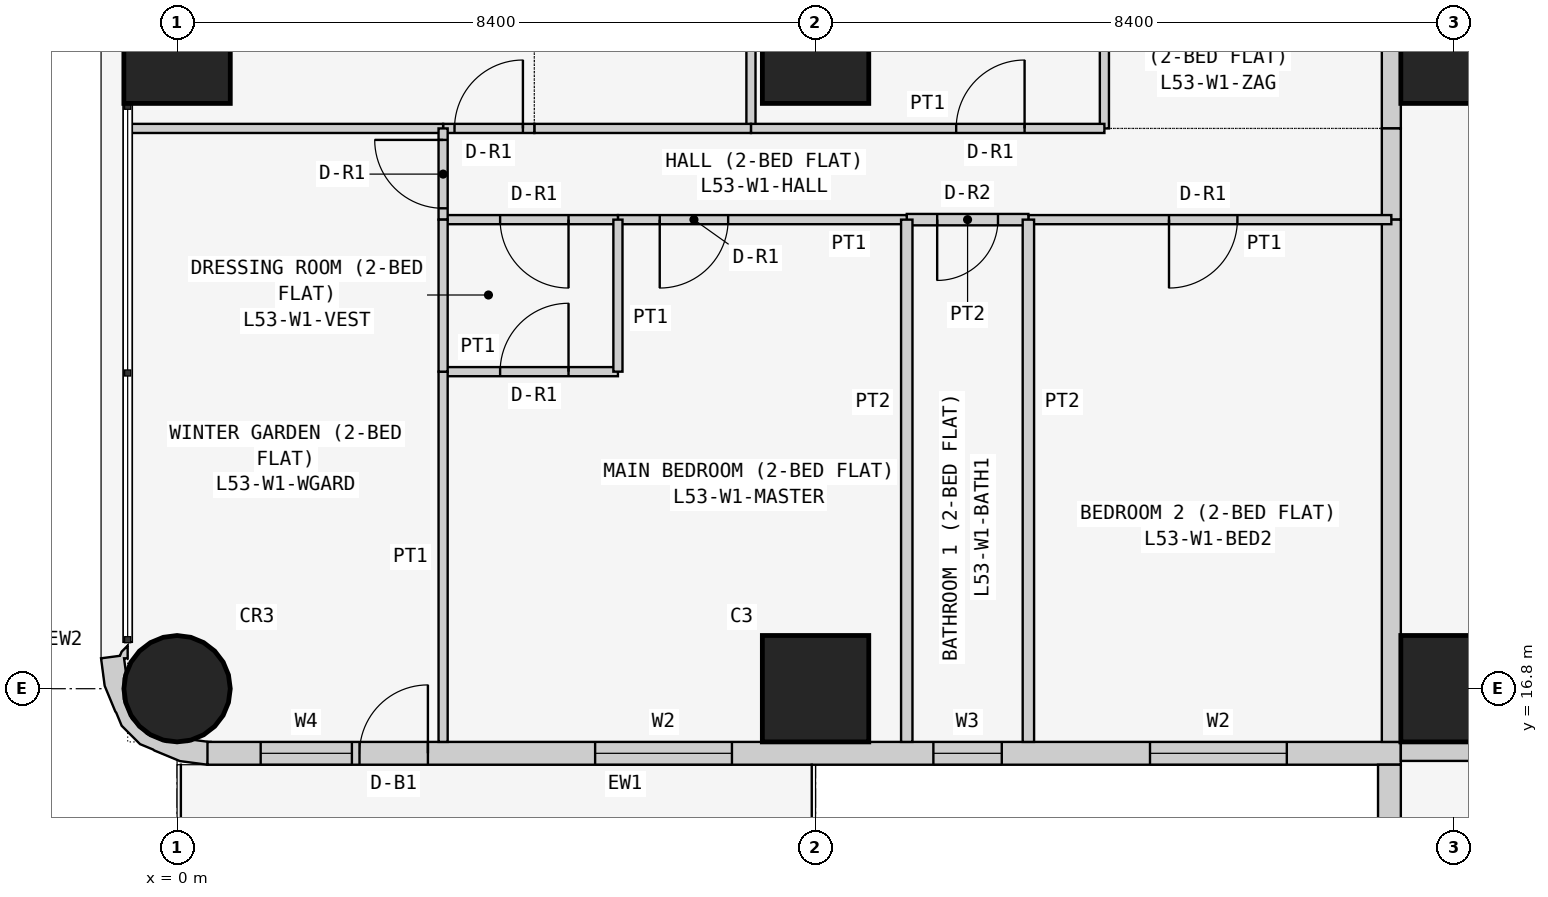
"""IFC4 building model, lengths in metres.
Left out: names, types, materials, properties, quantities, classifications, styles, units other than length and angle.
Written with IfcOpenShell. Run it as: python <this file> out.ifc"""

import sys

from ifc_helpers import new_model, si_unit, direction, frame, frame_2d, origin, origin_2d, place, context, subcontext, project, spatial, polyline, rectangle, circle, outline, extrude, element, fill, save


model = new_model("IFC4")
c1 = context("Model", 3, precision=1e-05, world=origin(), true_north=direction((0.0, 1.0)))
c2 = subcontext(c1, "Body", "Model", "MODEL_VIEW")
j1 = project(units=[si_unit("LENGTHUNIT", "METRE"), si_unit("PLANEANGLEUNIT", "RADIAN")], contexts=[c1])
p1 = place(None, origin())
s1 = spatial("IfcSite", under=j1, at=p1, CompositionType="ELEMENT")
p2 = place(p1, origin())
s2 = spatial("IfcBuilding", under=s1, at=p2, CompositionType="ELEMENT")
p3 = place(p2, frame((0.0, 0.0, 204.9)))
s3 = spatial("IfcBuildingStorey", under=s2, at=p3, CompositionType="ELEMENT", Elevation=204.9)
p4 = place(p3, frame((0.0, 16.8, 0.0), z_axis=(0.0, 0.0, 1.0), x_axis=(1.0, 0.0, 0.0)))
e1 = element("IfcColumn", 1, at=p4, inside=s3, PredefinedType="COLUMN", context=c2, shape_type="SweptSolid", body=[
    extrude(circle(Radius=0.7, at=origin_2d()), origin(), (0.0, 0.0, 1.0), 3.6),
])
for number, where, z_axis, x_axis in (
    (2, (0.0, 25.2, 0.0), (0.0, 0.0, 1.0), (1.0, 0.0, 0.0)),
    (3, (8.4, 16.8, 0.0), (0.0, 0.0, 1.0), (1.0, 0.0, 0.0)),
    (4, (8.4, 25.2, 0.0), (0.0, 0.0, 1.0), (1.0, 0.0, 0.0)),
    (5, (16.8, 16.8, 0.0), (0.0, 0.0, 1.0), (1.0, 0.0, 0.0)),
    (6, (16.8, 25.2, 0.0), (0.0, 0.0, 1.0), (1.0, 0.0, 0.0)),
):
    element("IfcColumn", number, at=place(p3, frame(where, z_axis=z_axis, x_axis=x_axis)), inside=s3, PredefinedType="COLUMN", context=c2, shape_type="SweptSolid", body=[
        extrude(rectangle(XDim=1.4, YDim=1.4, at=origin_2d()), origin(), (0.0, 0.0, 1.0), 3.6),
    ])
p5 = place(p3, frame((0.4, 15.95, 0.0), z_axis=(0.0, 0.0, 1.0), x_axis=(1.0, 0.0, 0.0)))
e7 = element("IfcWall", 7, at=p5, inside=s3, PredefinedType="SOLIDWALL", context=c2, shape_type="SweptSolid", body=[
    extrude(rectangle(XDim=15.7, YDim=0.3, at=frame_2d((7.85, 0.0))), origin(), (0.0, 0.0, 1.0), 3.45),
])
p6 = place(p5, frame((12.4, 0.0, 0.9)))
e8 = element("IfcOpeningElement", 8, at=p6, cuts=e7, PredefinedType="OPENING", context=c2, shape_type="SweptSolid", body=[
    extrude(rectangle(XDim=1.8, YDim=1.5, at=frame_2d((0.9, 0.75))), frame((0.0, 0.16, 0.0), z_axis=(0.0, -1.0, 0.0), x_axis=(1.0, 0.0, 0.0)), (0.0, 0.0, 1.0), 0.32),
])
p7 = place(p5, frame((9.55, 0.0, 1.5)))
e9 = element("IfcOpeningElement", 9, at=p7, cuts=e7, PredefinedType="OPENING", context=c2, shape_type="SweptSolid", body=[
    extrude(rectangle(XDim=0.9, YDim=0.7, at=frame_2d((0.45, 0.35))), frame((0.0, 0.16, 0.0), z_axis=(0.0, -1.0, 0.0), x_axis=(1.0, 0.0, 0.0)), (0.0, 0.0, 1.0), 0.32),
])
p8 = place(p5, frame((5.1, 0.0, 0.9)))
e10 = element("IfcOpeningElement", 10, at=p8, cuts=e7, PredefinedType="OPENING", context=c2, shape_type="SweptSolid", body=[
    extrude(rectangle(XDim=1.8, YDim=1.5, at=frame_2d((0.9, 0.75))), frame((0.0, 0.16, 0.0), z_axis=(0.0, -1.0, 0.0), x_axis=(1.0, 0.0, 0.0)), (0.0, 0.0, 1.0), 0.32),
])
p9 = place(p5, frame((2.0, 0.0, 0.0)))
e11 = element("IfcOpeningElement", 11, at=p9, cuts=e7, PredefinedType="OPENING", context=c2, shape_type="SweptSolid", body=[
    extrude(rectangle(XDim=0.9, YDim=2.4, at=frame_2d((0.45, 1.2))), frame((0.0, 0.16, 0.0), z_axis=(0.0, -1.0, 0.0), x_axis=(1.0, 0.0, 0.0)), (0.0, 0.0, 1.0), 0.32),
])
p10 = place(p5, frame((0.7, 0.0, 0.9)))
e12 = element("IfcOpeningElement", 12, at=p10, cuts=e7, PredefinedType="OPENING", context=c2, shape_type="SweptSolid", body=[
    extrude(rectangle(XDim=1.2, YDim=1.5, at=frame_2d((0.6, 0.75))), frame((0.0, 0.16, 0.0), z_axis=(0.0, -1.0, 0.0), x_axis=(1.0, 0.0, 0.0)), (0.0, 0.0, 1.0), 0.32),
])
p11 = place(p3, frame((15.95, 15.8, 0.0), z_axis=(0.0, 0.0, 1.0), x_axis=(0.0, -1.0, 0.0)))
e13 = element("IfcWall", 13, at=p11, inside=s3, PredefinedType="SOLIDWALL", context=c2, shape_type="SweptSolid", body=[
    extrude(rectangle(XDim=7.0, YDim=0.3, at=frame_2d((3.5, 0.0))), origin(), (0.0, 0.0, 1.0), 3.45),
])
p12 = place(p11, frame((1.5, 0.0, 0.9)))
e14 = element("IfcOpeningElement", 14, at=p12, cuts=e13, PredefinedType="OPENING", context=c2, shape_type="SweptSolid", body=[
    extrude(rectangle(XDim=2.4, YDim=1.5, at=frame_2d((1.2, 0.75))), frame((0.0, 0.16, 0.0), z_axis=(0.0, -1.0, 0.0), x_axis=(1.0, 0.0, 0.0)), (0.0, 0.0, 1.0), 0.32),
])
p13 = place(p11, frame((5.05, 0.0, 0.9)))
e15 = element("IfcOpeningElement", 15, at=p13, cuts=e13, PredefinedType="OPENING", context=c2, shape_type="SweptSolid", body=[
    extrude(rectangle(XDim=1.2, YDim=1.5, at=frame_2d((0.6, 0.75))), frame((0.0, 0.16, 0.0), z_axis=(0.0, -1.0, 0.0), x_axis=(1.0, 0.0, 0.0)), (0.0, 0.0, 1.0), 0.32),
])
p14 = place(p3, frame((-0.588, 17.312, 0.0), z_axis=(0.0, 0.0, 1.0), x_axis=(-0.898030234854, -0.439933741929, 0.0)))
e16 = element("IfcWall", 16, at=p14, inside=s3, PredefinedType="SOLIDWALL", context=c2, shape_type="SweptSolid", body=[
    extrude(outline(polyline([(-0.222, 1.793), (-0.39, 1.541), (-0.372, 1.532), (-0.195, 1.415), (-0.12, 1.41), (0.131, 1.287), (0.315, 1.078), (0.406, 0.814), (0.388, 0.536), (0.265, 0.285), (0.209, 0.236), (0.148, 0.053), (0.105, 0.074), (0.032, -0.076), (0.138, -0.039), (0.182, -0.0), (0.419, -0.08), (0.536, 0.266), (0.559, 0.631), (0.555, 0.651), (0.566, 0.836), (0.456, 1.159), (0.333, 1.298), (0.324, 1.316), (0.082, 1.591), (-0.222, 1.793)])), origin(), (0.0, 0.0, 1.0), 3.45),
])
p15 = place(p3, frame((22.971, 15.975, 0.0), z_axis=(0.0, 0.0, 1.0), x_axis=(-1.0, 0.0, 0.0)))
e17 = element("IfcWall", 17, at=p15, inside=s3, PredefinedType="PARTITIONING", context=c2, shape_type="SweptSolid", body=[
    extrude(rectangle(XDim=6.871, YDim=0.25, at=frame_2d((3.436, 0.0))), origin(), (0.0, 0.0, 1.0), 3.45),
])
p16 = place(p3, frame((15.975, 24.171, 0.0), z_axis=(0.0, 0.0, 1.0), x_axis=(0.0, 1.0, 0.0)))
e18 = element("IfcWall", 18, at=p16, inside=s3, PredefinedType="PARTITIONING", context=c2, shape_type="SweptSolid", body=[
    extrude(rectangle(XDim=5.229, YDim=0.25, at=frame_2d((2.615, 0.0))), origin(), (0.0, 0.0, 1.0), 3.45),
])
p17 = place(p16, frame((2.129, 0.0, 0.0)))
e19 = element("IfcOpeningElement", 19, at=p17, cuts=e18, PredefinedType="OPENING", context=c2, shape_type="SweptSolid", body=[
    extrude(rectangle(XDim=1.0, YDim=2.1, at=frame_2d((0.5, 1.05))), frame((0.0, 0.135, 0.0), z_axis=(0.0, -1.0, 0.0), x_axis=(1.0, 0.0, 0.0)), (0.0, 0.0, 1.0), 0.27),
])
p18 = place(p3, frame((15.975, 22.971, 0.0), z_axis=(0.0, 0.0, 1.0), x_axis=(0.0, 1.0, 0.0)))
e20 = element("IfcWall", 20, at=p18, inside=s3, PredefinedType="PARTITIONING", context=c2, shape_type="SweptSolid", body=[
    extrude(rectangle(XDim=1.2, YDim=0.25, at=frame_2d((0.6, 0.0))), origin(), (0.0, 0.0, 1.0), 3.45),
])
p19 = place(p3, frame((15.975, 16.1, 0.0), z_axis=(0.0, 0.0, 1.0), x_axis=(0.0, 1.0, 0.0)))
e21 = element("IfcWall", 21, at=p19, inside=s3, PredefinedType="PARTITIONING", context=c2, shape_type="SweptSolid", body=[
    extrude(rectangle(XDim=6.871, YDim=0.25, at=frame_2d((3.436, 0.0))), origin(), (0.0, 0.0, 1.0), 3.45),
])
for number, where, z_axis, x_axis in (
    (22, (12.2, 29.4, 0.0), (0.0, 0.0, 1.0), (0.0, -1.0, 0.0)),
    (23, (7.55, 29.4, 0.0), (0.0, 0.0, 1.0), (0.0, -1.0, 0.0)),
):
    element("IfcWall", number, at=place(p3, frame(where, z_axis=z_axis, x_axis=x_axis)), inside=s3, PredefinedType="PARTITIONING", context=c2, shape_type="SweptSolid", body=[
        extrude(rectangle(XDim=5.229, YDim=0.12, at=frame_2d((2.615, 0.0))), origin(), (0.0, 0.0, 1.0), 3.45),
    ])
p20 = place(p3, frame((7.55, 24.171, 0.0), z_axis=(0.0, 0.0, 1.0), x_axis=(1.0, 0.0, 0.0)))
e24 = element("IfcWall", 24, at=p20, inside=s3, PredefinedType="PARTITIONING", context=c2, shape_type="SweptSolid", body=[
    extrude(rectangle(XDim=4.65, YDim=0.12, at=frame_2d((2.325, 0.0))), origin(), (0.0, 0.0, 1.0), 3.45),
])
p21 = place(p20, frame((2.7, 0.0, 0.0)))
e25 = element("IfcOpeningElement", 25, at=p21, cuts=e24, PredefinedType="OPENING", context=c2, shape_type="SweptSolid", body=[
    extrude(rectangle(XDim=0.9, YDim=2.1, at=frame_2d((0.45, 1.05))), frame((0.0, 0.07, 0.0), z_axis=(0.0, -1.0, 0.0), x_axis=(1.0, 0.0, 0.0)), (0.0, 0.0, 1.0), 0.14),
])
p22 = place(p3, frame((4.7, 24.171, 0.0), z_axis=(0.0, 0.0, 1.0), x_axis=(1.0, 0.0, 0.0)))
e26 = element("IfcWall", 26, at=p22, inside=s3, PredefinedType="PARTITIONING", context=c2, shape_type="SweptSolid", body=[
    extrude(rectangle(XDim=2.85, YDim=0.12, at=frame_2d((1.425, 0.0))), origin(), (0.0, 0.0, 1.0), 3.45),
])
p23 = place(p3, frame((3.5, 24.171, 0.0), z_axis=(0.0, 0.0, 1.0), x_axis=(1.0, 0.0, 0.0)))
e27 = element("IfcWall", 27, at=p23, inside=s3, PredefinedType="PARTITIONING", context=c2, shape_type="SweptSolid", body=[
    extrude(rectangle(XDim=1.2, YDim=0.12, at=frame_2d((0.6, 0.0))), origin(), (0.0, 0.0, 1.0), 3.45),
])
p24 = place(p23, frame((0.15, 0.0, 0.0)))
e28 = element("IfcOpeningElement", 28, at=p24, cuts=e27, PredefinedType="OPENING", context=c2, shape_type="SweptSolid", body=[
    extrude(rectangle(XDim=0.9, YDim=2.1, at=frame_2d((0.45, 1.05))), frame((0.0, 0.07, 0.0), z_axis=(0.0, -1.0, 0.0), x_axis=(1.0, 0.0, 0.0)), (0.0, 0.0, 1.0), 0.14),
])
p25 = place(p3, frame((-0.65, 24.171, 0.0), z_axis=(0.0, 0.0, 1.0), x_axis=(1.0, 0.0, 0.0)))
e29 = element("IfcWall", 29, at=p25, inside=s3, PredefinedType="PARTITIONING", context=c2, shape_type="SweptSolid", body=[
    extrude(rectangle(XDim=4.15, YDim=0.12, at=frame_2d((2.075, 0.0))), origin(), (0.0, 0.0, 1.0), 3.45),
])
p26 = place(p3, frame((11.2, 22.971, 0.0), z_axis=(0.0, 0.0, 1.0), x_axis=(1.0, 0.0, 0.0)))
e30 = element("IfcWall", 30, at=p26, inside=s3, PredefinedType="PARTITIONING", context=c2, shape_type="SweptSolid", body=[
    extrude(rectangle(XDim=4.775, YDim=0.12, at=frame_2d((2.388, 0.0))), origin(), (0.0, 0.0, 1.0), 3.45),
])
p27 = place(p26, frame((1.85, 0.0, 0.0)))
e31 = element("IfcOpeningElement", 31, at=p27, cuts=e30, PredefinedType="OPENING", context=c2, shape_type="SweptSolid", body=[
    extrude(rectangle(XDim=0.9, YDim=2.1, at=frame_2d((0.45, 1.05))), frame((0.0, 0.07, 0.0), z_axis=(0.0, -1.0, 0.0), x_axis=(1.0, 0.0, 0.0)), (0.0, 0.0, 1.0), 0.14),
])
p28 = place(p3, frame((9.6, 22.971, 0.0), z_axis=(0.0, 0.0, 1.0), x_axis=(1.0, 0.0, 0.0)))
e32 = element("IfcWall", 32, at=p28, inside=s3, PredefinedType="PARTITIONING", context=c2, shape_type="SweptSolid", body=[
    extrude(rectangle(XDim=1.6, YDim=0.15, at=frame_2d((0.8, 0.0))), origin(), (0.0, 0.0, 1.0), 3.45),
])
p29 = place(p28, frame((0.4, 0.0, 0.0)))
e33 = element("IfcOpeningElement", 33, at=p29, cuts=e32, PredefinedType="OPENING", context=c2, shape_type="SweptSolid", body=[
    extrude(rectangle(XDim=0.8, YDim=2.1, at=frame_2d((0.4, 1.05))), frame((0.0, 0.085, 0.0), z_axis=(0.0, -1.0, 0.0), x_axis=(1.0, 0.0, 0.0)), (0.0, 0.0, 1.0), 0.17),
])
p30 = place(p3, frame((5.8, 22.971, 0.0), z_axis=(0.0, 0.0, 1.0), x_axis=(1.0, 0.0, 0.0)))
e34 = element("IfcWall", 34, at=p30, inside=s3, PredefinedType="PARTITIONING", context=c2, shape_type="SweptSolid", body=[
    extrude(rectangle(XDim=3.8, YDim=0.12, at=frame_2d((1.9, 0.0))), origin(), (0.0, 0.0, 1.0), 3.45),
])
p31 = place(p30, frame((0.55, 0.0, 0.0)))
e35 = element("IfcOpeningElement", 35, at=p31, cuts=e34, PredefinedType="OPENING", context=c2, shape_type="SweptSolid", body=[
    extrude(rectangle(XDim=0.9, YDim=2.1, at=frame_2d((0.45, 1.05))), frame((0.0, 0.07, 0.0), z_axis=(0.0, -1.0, 0.0), x_axis=(1.0, 0.0, 0.0)), (0.0, 0.0, 1.0), 0.14),
])
p32 = place(p3, frame((3.5, 22.971, 0.0), z_axis=(0.0, 0.0, 1.0), x_axis=(1.0, 0.0, 0.0)))
e36 = element("IfcWall", 36, at=p32, inside=s3, PredefinedType="PARTITIONING", context=c2, shape_type="SweptSolid", body=[
    extrude(rectangle(XDim=2.3, YDim=0.12, at=frame_2d((1.15, 0.0))), origin(), (0.0, 0.0, 1.0), 3.45),
])
p33 = place(p32, frame((0.75, 0.0, 0.0)))
e37 = element("IfcOpeningElement", 37, at=p33, cuts=e36, PredefinedType="OPENING", context=c2, shape_type="SweptSolid", body=[
    extrude(rectangle(XDim=0.9, YDim=2.1, at=frame_2d((0.45, 1.05))), frame((0.0, 0.07, 0.0), z_axis=(0.0, -1.0, 0.0), x_axis=(1.0, 0.0, 0.0)), (0.0, 0.0, 1.0), 0.14),
])
p34 = place(p3, frame((3.5, 24.171, 0.0), z_axis=(0.0, 0.0, 1.0), x_axis=(0.0, -1.0, 0.0)))
e38 = element("IfcWall", 38, at=p34, inside=s3, PredefinedType="PARTITIONING", context=c2, shape_type="SweptSolid", body=[
    extrude(rectangle(XDim=1.2, YDim=0.12, at=frame_2d((0.6, 0.0))), origin(), (0.0, 0.0, 1.0), 3.45),
])
p35 = place(p34, frame((0.151, 0.0, 0.0)))
e39 = element("IfcOpeningElement", 39, at=p35, cuts=e38, PredefinedType="OPENING", context=c2, shape_type="SweptSolid", body=[
    extrude(rectangle(XDim=0.9, YDim=2.1, at=frame_2d((0.45, 1.05))), frame((0.0, 0.07, 0.0), z_axis=(0.0, -1.0, 0.0), x_axis=(1.0, 0.0, 0.0)), (0.0, 0.0, 1.0), 0.14),
])
for number, where, z_axis, x_axis in (
    (40, (11.2, 22.971, 0.0), (0.0, 0.0, 1.0), (0.0, -1.0, 0.0)),
    (41, (9.6, 22.971, 0.0), (0.0, 0.0, 1.0), (0.0, -1.0, 0.0)),
):
    element("IfcWall", number, at=place(p3, frame(where, z_axis=z_axis, x_axis=x_axis)), inside=s3, PredefinedType="PARTITIONING", context=c2, shape_type="SweptSolid", body=[
        extrude(rectangle(XDim=6.871, YDim=0.15, at=frame_2d((3.436, 0.0))), origin(), (0.0, 0.0, 1.0), 3.45),
    ])
p36 = place(p3, frame((3.5, 20.971, 0.0), z_axis=(0.0, 0.0, 1.0), x_axis=(1.0, 0.0, 0.0)))
e42 = element("IfcWall", 42, at=p36, inside=s3, PredefinedType="PARTITIONING", context=c2, shape_type="SweptSolid", body=[
    extrude(rectangle(XDim=2.3, YDim=0.12, at=frame_2d((1.15, 0.0))), origin(), (0.0, 0.0, 1.0), 3.45),
])
p37 = place(p36, frame((0.75, 0.0, 0.0)))
e43 = element("IfcOpeningElement", 43, at=p37, cuts=e42, PredefinedType="OPENING", context=c2, shape_type="SweptSolid", body=[
    extrude(rectangle(XDim=0.9, YDim=2.1, at=frame_2d((0.45, 1.05))), frame((0.0, 0.07, 0.0), z_axis=(0.0, -1.0, 0.0), x_axis=(1.0, 0.0, 0.0)), (0.0, 0.0, 1.0), 0.14),
])
p38 = place(p3, frame((5.8, 20.971, 0.0), z_axis=(0.0, 0.0, 1.0), x_axis=(0.0, 1.0, 0.0)))
e44 = element("IfcWall", 44, at=p38, inside=s3, PredefinedType="PARTITIONING", context=c2, shape_type="SweptSolid", body=[
    extrude(rectangle(XDim=2.0, YDim=0.12, at=frame_2d((1.0, 0.0))), origin(), (0.0, 0.0, 1.0), 3.45),
])
p39 = place(p3, frame((3.5, 16.1, 0.0), z_axis=(0.0, 0.0, 1.0), x_axis=(0.0, 1.0, 0.0)))
e45 = element("IfcWall", 45, at=p39, inside=s3, PredefinedType="PARTITIONING", context=c2, shape_type="SweptSolid", body=[
    extrude(rectangle(XDim=4.871, YDim=0.12, at=frame_2d((2.436, 0.0))), origin(), (0.0, 0.0, 1.0), 3.45),
])
p40 = place(p3, frame((3.5, 22.971, 0.0), z_axis=(0.0, 0.0, 1.0), x_axis=(0.0, -1.0, 0.0)))
e46 = element("IfcWall", 46, at=p40, inside=s3, PredefinedType="PARTITIONING", context=c2, shape_type="SweptSolid", body=[
    extrude(rectangle(XDim=2.0, YDim=0.12, at=frame_2d((1.0, 0.0))), origin(), (0.0, 0.0, 1.0), 3.45),
])
p41 = place(p6, origin())
e47 = element("IfcWindow", 47, at=p41, inside=s3, PartitioningType="SINGLE_PANEL", PredefinedType="WINDOW", context=c2, shape_type="SweptSolid", body=[
    extrude(rectangle(XDim=1.8, YDim=1.5, at=frame_2d((0.9, 0.75))), frame((0.0, 0.03, 0.0), z_axis=(0.0, -1.0, 0.0), x_axis=(1.0, 0.0, 0.0)), (0.0, 0.0, 1.0), 0.06),
])
fill(e8, e47)
p42 = place(p7, origin())
e48 = element("IfcWindow", 48, at=p42, inside=s3, PartitioningType="SINGLE_PANEL", PredefinedType="WINDOW", context=c2, shape_type="SweptSolid", body=[
    extrude(rectangle(XDim=0.9, YDim=0.7, at=frame_2d((0.45, 0.35))), frame((0.0, 0.03, 0.0), z_axis=(0.0, -1.0, 0.0), x_axis=(1.0, 0.0, 0.0)), (0.0, 0.0, 1.0), 0.06),
])
fill(e9, e48)
p43 = place(p8, origin())
e49 = element("IfcWindow", 49, at=p43, inside=s3, PartitioningType="SINGLE_PANEL", PredefinedType="WINDOW", context=c2, shape_type="SweptSolid", body=[
    extrude(rectangle(XDim=1.8, YDim=1.5, at=frame_2d((0.9, 0.75))), frame((0.0, 0.03, 0.0), z_axis=(0.0, -1.0, 0.0), x_axis=(1.0, 0.0, 0.0)), (0.0, 0.0, 1.0), 0.06),
])
fill(e10, e49)
p44 = place(p9, origin())
e50 = element("IfcDoor", 50, at=p44, inside=s3, OperationType="SINGLE_SWING_RIGHT", PredefinedType="DOOR", context=c2, shape_type="SweptSolid", body=[
    extrude(rectangle(XDim=0.9, YDim=2.4, at=frame_2d((0.45, 1.2))), frame((0.0, 0.025, 0.0), z_axis=(0.0, -1.0, 0.0), x_axis=(1.0, 0.0, 0.0)), (0.0, 0.0, 1.0), 0.05),
])
fill(e11, e50)
p45 = place(p10, origin())
e51 = element("IfcWindow", 51, at=p45, inside=s3, PartitioningType="SINGLE_PANEL", PredefinedType="WINDOW", context=c2, shape_type="SweptSolid", body=[
    extrude(rectangle(XDim=1.2, YDim=1.5, at=frame_2d((0.6, 0.75))), frame((0.0, 0.03, 0.0), z_axis=(0.0, -1.0, 0.0), x_axis=(1.0, 0.0, 0.0)), (0.0, 0.0, 1.0), 0.06),
])
fill(e12, e51)
p46 = place(p21, origin())
e52 = element("IfcDoor", 52, at=p46, inside=s3, OperationType="SINGLE_SWING_RIGHT", PredefinedType="DOOR", context=c2, shape_type="SweptSolid", body=[
    extrude(rectangle(XDim=0.9, YDim=2.1, at=frame_2d((0.45, 1.05))), frame((0.0, 0.025, 0.0), z_axis=(0.0, -1.0, 0.0), x_axis=(1.0, 0.0, 0.0)), (0.0, 0.0, 1.0), 0.05),
])
fill(e25, e52)
p47 = place(p24, origin())
e53 = element("IfcDoor", 53, at=p47, inside=s3, OperationType="SINGLE_SWING_RIGHT", PredefinedType="DOOR", context=c2, shape_type="SweptSolid", body=[
    extrude(rectangle(XDim=0.9, YDim=2.1, at=frame_2d((0.45, 1.05))), frame((0.0, 0.025, 0.0), z_axis=(0.0, -1.0, 0.0), x_axis=(1.0, 0.0, 0.0)), (0.0, 0.0, 1.0), 0.05),
])
fill(e28, e53)
p48 = place(p27, frame((0.9, 0.0, 0.0), z_axis=(0.0, 0.0, 1.0), x_axis=(-1.0, 0.0, 0.0)))
e54 = element("IfcDoor", 54, at=p48, inside=s3, OperationType="SINGLE_SWING_RIGHT", PredefinedType="DOOR", context=c2, shape_type="SweptSolid", body=[
    extrude(rectangle(XDim=0.9, YDim=2.1, at=frame_2d((0.45, 1.05))), frame((0.0, 0.025, 0.0), z_axis=(0.0, -1.0, 0.0), x_axis=(1.0, 0.0, 0.0)), (0.0, 0.0, 1.0), 0.05),
])
fill(e31, e54)
p49 = place(p29, frame((0.8, 0.0, 0.0), z_axis=(0.0, 0.0, 1.0), x_axis=(-1.0, 0.0, 0.0)))
e55 = element("IfcDoor", 55, at=p49, inside=s3, OperationType="SINGLE_SWING_RIGHT", PredefinedType="DOOR", context=c2, shape_type="SweptSolid", body=[
    extrude(rectangle(XDim=0.8, YDim=2.1, at=frame_2d((0.4, 1.05))), frame((0.0, 0.025, 0.0), z_axis=(0.0, -1.0, 0.0), x_axis=(1.0, 0.0, 0.0)), (0.0, 0.0, 1.0), 0.05),
])
fill(e33, e55)
p50 = place(p31, frame((0.9, 0.0, 0.0), z_axis=(0.0, 0.0, 1.0), x_axis=(-1.0, 0.0, 0.0)))
e56 = element("IfcDoor", 56, at=p50, inside=s3, OperationType="SINGLE_SWING_RIGHT", PredefinedType="DOOR", context=c2, shape_type="SweptSolid", body=[
    extrude(rectangle(XDim=0.9, YDim=2.1, at=frame_2d((0.45, 1.05))), frame((0.0, 0.025, 0.0), z_axis=(0.0, -1.0, 0.0), x_axis=(1.0, 0.0, 0.0)), (0.0, 0.0, 1.0), 0.05),
])
fill(e35, e56)
p51 = place(p33, frame((0.9, 0.0, 0.0), z_axis=(0.0, 0.0, 1.0), x_axis=(-1.0, 0.0, 0.0)))
e57 = element("IfcDoor", 57, at=p51, inside=s3, OperationType="SINGLE_SWING_LEFT", PredefinedType="DOOR", context=c2, shape_type="SweptSolid", body=[
    extrude(rectangle(XDim=0.9, YDim=2.1, at=frame_2d((0.45, 1.05))), frame((0.0, 0.025, 0.0), z_axis=(0.0, -1.0, 0.0), x_axis=(1.0, 0.0, 0.0)), (0.0, 0.0, 1.0), 0.05),
])
fill(e37, e57)
p52 = place(p37, origin())
e58 = element("IfcDoor", 58, at=p52, inside=s3, OperationType="SINGLE_SWING_RIGHT", PredefinedType="DOOR", context=c2, shape_type="SweptSolid", body=[
    extrude(rectangle(XDim=0.9, YDim=2.1, at=frame_2d((0.45, 1.05))), frame((0.0, 0.025, 0.0), z_axis=(0.0, -1.0, 0.0), x_axis=(1.0, 0.0, 0.0)), (0.0, 0.0, 1.0), 0.05),
])
fill(e43, e58)
p53 = place(p35, frame((0.9, 0.0, 0.0), z_axis=(0.0, 0.0, 1.0), x_axis=(-1.0, 0.0, 0.0)))
e59 = element("IfcDoor", 59, at=p53, inside=s3, OperationType="SINGLE_SWING_RIGHT", PredefinedType="DOOR", context=c2, shape_type="SweptSolid", body=[
    extrude(rectangle(XDim=0.9, YDim=2.1, at=frame_2d((0.45, 1.05))), frame((0.0, 0.025, 0.0), z_axis=(0.0, -1.0, 0.0), x_axis=(1.0, 0.0, 0.0)), (0.0, 0.0, 1.0), 0.05),
])
fill(e39, e59)
save(model, sys.argv[1])
